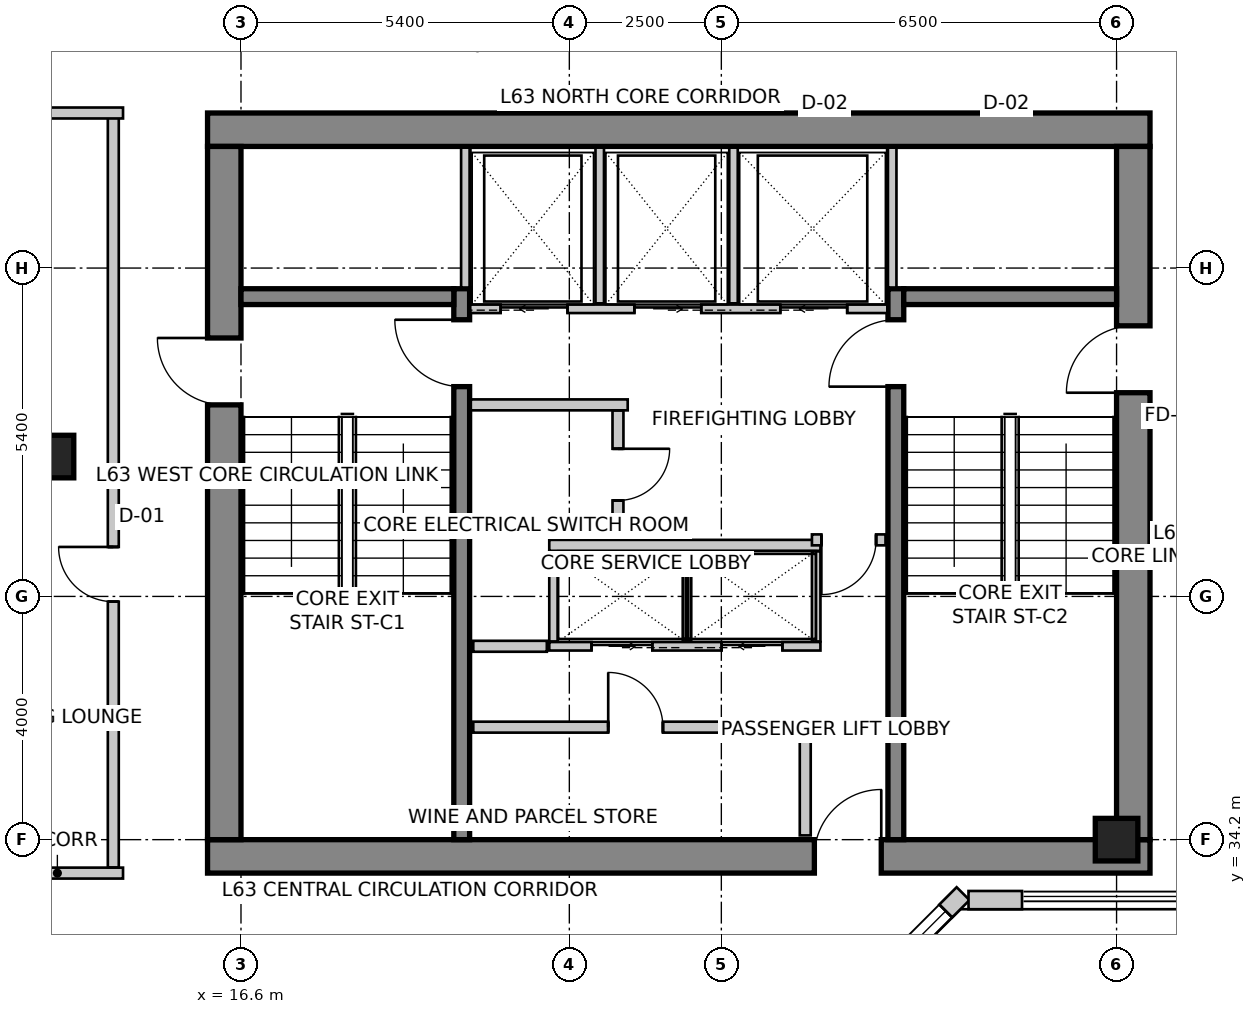
"""IFC4 building model, lengths in metres.
Left out: names, types, materials, properties, quantities, classifications, styles, units other than length and angle.
Written with IfcOpenShell. Run it as: python <this file> out.ifc"""

import sys

from ifc_helpers import new_model, si_unit, direction, frame, frame_2d, origin, origin_2d, place, context, subcontext, project, spatial, rectangle, extrude, source, transform, mapped, element, fill, save


model = new_model("IFC4")
c1 = context("Model", 3, precision=1e-05, world=origin(), true_north=direction((0.0, 1.0)))
c2 = subcontext(c1, "Body", "Model", "MODEL_VIEW")
j1 = project(units=[si_unit("LENGTHUNIT", "METRE"), si_unit("PLANEANGLEUNIT", "RADIAN")], contexts=[c1])
p1 = place(None, origin())
s1 = spatial("IfcSite", under=j1, at=p1, CompositionType="ELEMENT")
p2 = place(p1, origin())
s2 = spatial("IfcBuilding", under=s1, at=p2, CompositionType="ELEMENT")
p3 = place(p2, frame((0.0, 0.0, 249.3)))
s3 = spatial("IfcBuildingStorey", under=s2, at=p3, CompositionType="ELEMENT", Elevation=249.3)
p4 = place(p3, frame((16.05, 45.875, 0.0), z_axis=(0.0, 0.0, 1.0), x_axis=(1.0, 0.0, 0.0)))
e1 = element("IfcWall", 1, at=p4, inside=s3, PredefinedType="SHEAR", context=c2, shape_type="SweptSolid", body=[
    extrude(rectangle(XDim=15.5, YDim=0.55, at=frame_2d((7.75, 0.0))), origin(), (0.0, 0.0, 1.0), 3.6),
])
p5 = place(p3, frame((16.05, 33.925, 0.0), z_axis=(0.0, 0.0, 1.0), x_axis=(1.0, 0.0, 0.0)))
e2 = element("IfcWall", 2, at=p5, inside=s3, PredefinedType="SHEAR", context=c2, shape_type="SweptSolid", body=[
    extrude(rectangle(XDim=15.5, YDim=0.55, at=frame_2d((7.75, 0.0))), origin(), (0.0, 0.0, 1.0), 3.6),
])
m1 = source(origin(), c2, "Body", "SweptSolid", [
    extrude(rectangle(XDim=1.1, YDim=2.15, at=frame_2d((0.55, 1.075))), frame((0.0, 0.285, 0.0), z_axis=(0.0, -1.0, 0.0), x_axis=(1.0, 0.0, 0.0)), (0.0, 0.0, 1.0), 0.57),
])
p6 = place(p5, frame((9.98, 0.0, 0.0)))
e3 = element("IfcOpeningElement", 3, at=p6, cuts=e2, PredefinedType="OPENING", context=c2, shape_type="MappedRepresentation", body=[
    mapped(m1, transform((0.0, 0.0, 0.0), scale=1.0)),
])
p7 = place(p3, frame((16.325, 34.2, 0.0), z_axis=(0.0, 0.0, 1.0), x_axis=(0.0, 1.0, 0.0)))
e4 = element("IfcWall", 4, at=p7, inside=s3, PredefinedType="SHEAR", context=c2, shape_type="SweptSolid", body=[
    extrude(rectangle(XDim=11.4, YDim=0.55, at=frame_2d((5.7, 0.0))), origin(), (0.0, 0.0, 1.0), 3.6),
])
p8 = place(p7, frame((7.15, 0.0, 0.0)))
e5 = element("IfcOpeningElement", 5, at=p8, cuts=e4, PredefinedType="OPENING", context=c2, shape_type="MappedRepresentation", body=[
    mapped(m1, transform((0.0, 0.0, 0.0), scale=1.0)),
])
p9 = place(p3, frame((31.275, 34.2, 0.0), z_axis=(0.0, 0.0, 1.0), x_axis=(0.0, 1.0, 0.0)))
e6 = element("IfcWall", 6, at=p9, inside=s3, PredefinedType="SHEAR", context=c2, shape_type="SweptSolid", body=[
    extrude(rectangle(XDim=11.4, YDim=0.55, at=frame_2d((5.7, 0.0))), origin(), (0.0, 0.0, 1.0), 3.6),
])
p10 = place(p9, frame((7.35, 0.0, 0.0)))
e7 = element("IfcOpeningElement", 7, at=p10, cuts=e6, PredefinedType="OPENING", context=c2, shape_type="MappedRepresentation", body=[
    mapped(m1, transform((0.0, 0.0, 0.0), scale=1.0)),
])
p11 = place(p3, frame((20.23, 34.2, 0.0), z_axis=(0.0, 0.0, 1.0), x_axis=(0.0, 1.0, 0.0)))
e8 = element("IfcWall", 8, at=p11, inside=s3, PredefinedType="SHEAR", context=c2, shape_type="SweptSolid", body=[
    extrude(rectangle(XDim=9.06, YDim=0.26, at=frame_2d((4.53, 0.0))), origin(), (0.0, 0.0, 1.0), 3.6),
])
m2 = source(origin(), c2, "Body", "SweptSolid", [
    extrude(rectangle(XDim=1.1, YDim=2.15, at=frame_2d((0.55, 1.075))), frame((0.0, 0.14, 0.0), z_axis=(0.0, -1.0, 0.0), x_axis=(1.0, 0.0, 0.0)), (0.0, 0.0, 1.0), 0.28),
])
p12 = place(p11, frame((7.45, 0.0, 0.0)))
e9 = element("IfcOpeningElement", 9, at=p12, cuts=e8, PredefinedType="OPENING", context=c2, shape_type="MappedRepresentation", body=[
    mapped(m2, transform((0.0, 0.0, 0.0), scale=1.0)),
])
p13 = place(p3, frame((27.37, 34.2, 0.0), z_axis=(0.0, 0.0, 1.0), x_axis=(0.0, 1.0, 0.0)))
e10 = element("IfcWall", 10, at=p13, inside=s3, PredefinedType="SHEAR", context=c2, shape_type="SweptSolid", body=[
    extrude(rectangle(XDim=9.06, YDim=0.26, at=frame_2d((4.53, 0.0))), origin(), (0.0, 0.0, 1.0), 3.6),
])
p14 = place(p13, frame((7.45, 0.0, 0.0)))
e11 = element("IfcOpeningElement", 11, at=p14, cuts=e10, PredefinedType="OPENING", context=c2, shape_type="MappedRepresentation", body=[
    mapped(m2, transform((0.0, 0.0, 0.0), scale=1.0)),
])
for number, where, z_axis, x_axis in (
    (12, (16.6, 43.13, 0.0), (0.0, 0.0, 1.0), (1.0, 0.0, 0.0)),
    (13, (27.5, 43.13, 0.0), (0.0, 0.0, 1.0), (1.0, 0.0, 0.0)),
):
    element("IfcWall", number, at=place(p3, frame(where, z_axis=z_axis, x_axis=x_axis)), inside=s3, PredefinedType="SHEAR", context=c2, shape_type="SweptSolid", body=[
        extrude(rectangle(XDim=3.5, YDim=0.26, at=frame_2d((1.75, 0.0))), origin(), (0.0, 0.0, 1.0), 3.6),
    ])
m3 = source(origin(), c2, "Body", "SweptSolid", [
    extrude(rectangle(XDim=0.7, YDim=0.7, at=origin_2d()), origin(), (0.0, 0.0, 1.0), 3.6),
])
for number, where, z_axis, x_axis in (
    (14, (13.5, 40.5, 0.0), (0.0, 0.0, 1.0), (1.0, 0.0, 0.0)),
    (15, (31.0, 34.2, 0.0), (0.0, 0.0, 1.0), (1.0, 0.0, 0.0)),
):
    element("IfcColumn", number, at=place(p3, frame(where, z_axis=z_axis, x_axis=x_axis)), inside=s3, PredefinedType="COLUMN", context=c2, shape_type="MappedRepresentation", body=[
        mapped(m3, transform((0.0, 0.0, 0.0), scale=1.0)),
    ])
p15 = place(p3, frame((26.42, 31.256, 0.0), z_axis=(0.0, 0.0, 1.0), x_axis=(0.707106781187, 0.707106781187, 0.0)))
e16 = element("IfcWall", 16, at=p15, inside=s3, PredefinedType="SOLIDWALL", context=c2, shape_type="SweptSolid", body=[
    extrude(rectangle(XDim=2.907, YDim=0.3, at=frame_2d((1.454, 0.0))), origin(), (0.0, 0.0, 1.0), 3.35),
])
m4 = source(origin(), c2, "Body", "SweptSolid", [
    extrude(rectangle(XDim=2.1, YDim=2.0, at=frame_2d((1.05, 1.0))), frame((0.0, 0.16, 0.0), z_axis=(0.0, -1.0, 0.0), x_axis=(1.0, 0.0, 0.0)), (0.0, 0.0, 1.0), 0.32),
])
p16 = place(p15, frame((0.404, 0.0, 0.85)))
e17 = element("IfcOpeningElement", 17, at=p16, cuts=e16, PredefinedType="OPENING", context=c2, shape_type="MappedRepresentation", body=[
    mapped(m4, transform((0.0, 0.0, 0.0), scale=1.0)),
])
p17 = place(p3, frame((28.565, 33.206, 0.0), z_axis=(0.0, 0.0, 1.0), x_axis=(1.0, 0.0, 0.0)))
e18 = element("IfcWall", 18, at=p17, inside=s3, PredefinedType="SOLIDWALL", context=c2, shape_type="SweptSolid", body=[
    extrude(rectangle(XDim=0.88, YDim=0.3, at=frame_2d((0.44, 0.0))), origin(), (0.0, 0.0, 1.0), 3.35),
])
p18 = place(p3, frame((21.874, 52.742, 0.0), z_axis=(0.0, 0.0, 1.0), x_axis=(-0.84365659959, -0.536883173482, 0.0)))
e19 = element("IfcWall", 19, at=p18, inside=s3, PredefinedType="SOLIDWALL", context=c2, shape_type="SweptSolid", body=[
    extrude(rectangle(XDim=10.283, YDim=0.3, at=frame_2d((5.142, 0.0))), origin(), (0.0, 0.0, 1.0), 3.35),
])
m5 = source(origin(), c2, "Body", "SweptSolid", [
    extrude(rectangle(XDim=2.4, YDim=2.2, at=frame_2d((1.2, 1.1))), frame((0.0, 0.16, 0.0), z_axis=(0.0, -1.0, 0.0), x_axis=(1.0, 0.0, 0.0)), (0.0, 0.0, 1.0), 0.32),
])
p19 = place(p18, frame((1.26, 0.0, 0.85)))
e20 = element("IfcOpeningElement", 20, at=p19, cuts=e19, PredefinedType="OPENING", context=c2, shape_type="MappedRepresentation", body=[
    mapped(m5, transform((0.0, 0.0, 0.0), scale=1.0)),
])
p20 = place(p18, frame((5.69, 0.0, 0.85)))
e21 = element("IfcOpeningElement", 21, at=p20, cuts=e19, PredefinedType="OPENING", context=c2, shape_type="MappedRepresentation", body=[
    mapped(m4, transform((0.0, 0.0, 0.0), scale=1.0)),
])
p21 = place(p3, frame((20.37, 42.93, 0.0), z_axis=(0.0, 0.0, 1.0), x_axis=(1.0, 0.0, 0.0)))
e22 = element("IfcWall", 22, at=p21, inside=s3, PredefinedType="SOLIDWALL", context=c2, shape_type="SweptSolid", body=[
    extrude(rectangle(XDim=6.86, YDim=0.14, at=frame_2d((3.43, 0.0))), origin(), (0.0, 0.0, 1.0), 3.35),
])
m6 = source(origin(), c2, "Body", "SweptSolid", [
    extrude(rectangle(XDim=1.1, YDim=2.15, at=frame_2d((0.55, 1.075))), frame((0.0, 0.08, 0.0), z_axis=(0.0, -1.0, 0.0), x_axis=(1.0, 0.0, 0.0)), (0.0, 0.0, 1.0), 0.16),
])
p22 = place(p21, frame((0.5, 0.0, 0.0)))
e23 = element("IfcOpeningElement", 23, at=p22, cuts=e22, PredefinedType="OPENING", context=c2, shape_type="MappedRepresentation", body=[
    mapped(m6, transform((0.0, 0.0, 0.0), scale=1.0)),
])
p23 = place(p21, frame((2.7, 0.0, 0.0)))
e24 = element("IfcOpeningElement", 24, at=p23, cuts=e22, PredefinedType="OPENING", context=c2, shape_type="MappedRepresentation", body=[
    mapped(m6, transform((0.0, 0.0, 0.0), scale=1.0)),
])
p24 = place(p21, frame((5.1, 0.0, 0.0)))
e25 = element("IfcOpeningElement", 25, at=p24, cuts=e22, PredefinedType="OPENING", context=c2, shape_type="MappedRepresentation", body=[
    mapped(m6, transform((0.0, 0.0, 0.0), scale=1.0)),
])
for number, where, z_axis, x_axis in (
    (26, (20.29, 43.28, 0.0), (0.0, 0.0, 1.0), (0.0, 1.0, 0.0)),
    (27, (27.31, 43.28, 0.0), (0.0, 0.0, 1.0), (0.0, 1.0, 0.0)),
):
    element("IfcWall", number, at=place(p3, frame(where, z_axis=z_axis, x_axis=x_axis)), inside=s3, PredefinedType="SOLIDWALL", context=c2, shape_type="SweptSolid", body=[
        extrude(rectangle(XDim=2.3, YDim=0.14, at=frame_2d((1.15, 0.0))), origin(), (0.0, 0.0, 1.0), 3.35),
    ])
for number, where, z_axis, x_axis in (
    (28, (22.5, 43.02, 0.0), (0.0, 0.0, 1.0), (0.0, 1.0, 0.0)),
    (29, (24.7, 43.02, 0.0), (0.0, 0.0, 1.0), (0.0, 1.0, 0.0)),
):
    element("IfcWall", number, at=place(p3, frame(where, z_axis=z_axis, x_axis=x_axis)), inside=s3, PredefinedType="SOLIDWALL", context=c2, shape_type="SweptSolid", body=[
        extrude(rectangle(XDim=2.56, YDim=0.14, at=frame_2d((1.28, 0.0))), origin(), (0.0, 0.0, 1.0), 3.35),
    ])
p25 = place(p3, frame((21.67, 37.38, 0.0), z_axis=(0.0, 0.0, 1.0), x_axis=(1.0, 0.0, 0.0)))
e30 = element("IfcWall", 30, at=p25, inside=s3, PredefinedType="SOLIDWALL", context=c2, shape_type="SweptSolid", body=[
    extrude(rectangle(XDim=4.46, YDim=0.14, at=frame_2d((2.23, 0.0))), origin(), (0.0, 0.0, 1.0), 3.35),
])
m7 = source(origin(), c2, "Body", "SweptSolid", [
    extrude(rectangle(XDim=1.0, YDim=2.15, at=frame_2d((0.5, 1.075))), frame((0.0, 0.08, 0.0), z_axis=(0.0, -1.0, 0.0), x_axis=(1.0, 0.0, 0.0)), (0.0, 0.0, 1.0), 0.16),
])
p26 = place(p25, frame((0.695, 0.0, 0.0)))
e31 = element("IfcOpeningElement", 31, at=p26, cuts=e30, PredefinedType="OPENING", context=c2, shape_type="MappedRepresentation", body=[
    mapped(m7, transform((0.0, 0.0, 0.0), scale=1.0)),
])
p27 = place(p25, frame((2.835, 0.0, 0.0)))
e32 = element("IfcOpeningElement", 32, at=p27, cuts=e30, PredefinedType="OPENING", context=c2, shape_type="MappedRepresentation", body=[
    mapped(m7, transform((0.0, 0.0, 0.0), scale=1.0)),
])
p28 = place(p3, frame((21.67, 39.04, 0.0), z_axis=(0.0, 0.0, 1.0), x_axis=(1.0, 0.0, 0.0)))
e33 = element("IfcWall", 33, at=p28, inside=s3, PredefinedType="SOLIDWALL", context=c2, shape_type="SweptSolid", body=[
    extrude(rectangle(XDim=4.46, YDim=0.18, at=frame_2d((2.23, 0.0))), origin(), (0.0, 0.0, 1.0), 3.35),
])
for number, where, z_axis, x_axis in (
    (34, (26.06, 37.46, 0.0), (0.0, 0.0, 1.0), (0.0, 1.0, 0.0)),
    (35, (21.74, 37.46, 0.0), (0.0, 0.0, 1.0), (0.0, 1.0, 0.0)),
    (36, (23.935, 37.46, 0.0), (0.0, 0.0, 1.0), (0.0, 1.0, 0.0)),
):
    element("IfcWall", number, at=place(p3, frame(where, z_axis=z_axis, x_axis=x_axis)), inside=s3, PredefinedType="SOLIDWALL", context=c2, shape_type="SweptSolid", body=[
        extrude(rectangle(XDim=1.48, YDim=0.14, at=frame_2d((0.74, 0.0))), origin(), (0.0, 0.0, 1.0), 3.35),
    ])
p29 = place(p3, frame((22.96, 41.35, 0.0), z_axis=(0.0, 0.0, 1.0), x_axis=(-1.0, 0.0, 0.0)))
e37 = element("IfcWall", 37, at=p29, inside=s3, PredefinedType="PARTITIONING", context=c2, shape_type="SweptSolid", body=[
    extrude(rectangle(XDim=2.58, YDim=0.18, at=frame_2d((1.29, 0.0))), origin(), (0.0, 0.0, 1.0), 3.35),
])
p30 = place(p3, frame((22.8, 41.256, 0.0), z_axis=(0.0, 0.0, 1.0), x_axis=(0.0, -1.0, 0.0)))
e38 = element("IfcWall", 38, at=p30, inside=s3, PredefinedType="PARTITIONING", context=c2, shape_type="SweptSolid", body=[
    extrude(rectangle(XDim=2.106, YDim=0.18, at=frame_2d((1.053, 0.0))), origin(), (0.0, 0.0, 1.0), 3.35),
])
m8 = source(origin(), c2, "Body", "SweptSolid", [
    extrude(rectangle(XDim=0.85, YDim=2.15, at=frame_2d((0.425, 1.075))), frame((0.0, 0.1, 0.0), z_axis=(0.0, -1.0, 0.0), x_axis=(1.0, 0.0, 0.0)), (0.0, 0.0, 1.0), 0.2),
])
p31 = place(p30, frame((0.628, 0.0, 0.0)))
e39 = element("IfcOpeningElement", 39, at=p31, cuts=e38, PredefinedType="OPENING", context=c2, shape_type="MappedRepresentation", body=[
    mapped(m8, transform((0.0, 0.0, 0.0), scale=1.0)),
])
p32 = place(p3, frame((21.63, 37.38, 0.0), z_axis=(0.0, 0.0, 1.0), x_axis=(-1.0, 0.0, 0.0)))
e40 = element("IfcWall", 40, at=p32, inside=s3, PredefinedType="PARTITIONING", context=c2, shape_type="SweptSolid", body=[
    extrude(rectangle(XDim=1.21, YDim=0.18, at=frame_2d((0.605, 0.0))), origin(), (0.0, 0.0, 1.0), 3.35),
])
p33 = place(p3, frame((27.2, 39.13, 0.0), z_axis=(0.0, 0.0, 1.0), x_axis=(-1.0, 0.0, 0.0)))
e41 = element("IfcWall", 41, at=p33, inside=s3, PredefinedType="PARTITIONING", context=c2, shape_type="SweptSolid", body=[
    extrude(rectangle(XDim=1.21, YDim=0.18, at=frame_2d((0.605, 0.0))), origin(), (0.0, 0.0, 1.0), 3.35),
])
m9 = source(origin(), c2, "Body", "SweptSolid", [
    extrude(rectangle(XDim=0.9, YDim=2.15, at=frame_2d((0.45, 1.075))), frame((0.0, 0.1, 0.0), z_axis=(0.0, -1.0, 0.0), x_axis=(1.0, 0.0, 0.0)), (0.0, 0.0, 1.0), 0.2),
])
p34 = place(p33, frame((0.155, 0.0, 0.0)))
e42 = element("IfcOpeningElement", 42, at=p34, cuts=e41, PredefinedType="OPENING", context=c2, shape_type="MappedRepresentation", body=[
    mapped(m9, transform((0.0, 0.0, 0.0), scale=1.0)),
])
p35 = place(p3, frame((20.42, 36.05, 0.0), z_axis=(0.0, 0.0, 1.0), x_axis=(1.0, 0.0, 0.0)))
e43 = element("IfcWall", 43, at=p35, inside=s3, PredefinedType="PARTITIONING", context=c2, shape_type="SweptSolid", body=[
    extrude(rectangle(XDim=5.46, YDim=0.18, at=frame_2d((2.73, 0.0))), origin(), (0.0, 0.0, 1.0), 3.35),
])
p36 = place(p35, frame((2.219, 0.0, 0.0)))
e44 = element("IfcOpeningElement", 44, at=p36, cuts=e43, PredefinedType="OPENING", context=c2, shape_type="MappedRepresentation", body=[
    mapped(m9, transform((0.0, 0.0, 0.0), scale=1.0)),
])
p37 = place(p3, frame((25.88, 35.956, 0.0), z_axis=(0.0, 0.0, 1.0), x_axis=(0.0, -1.0, 0.0)))
e45 = element("IfcWall", 45, at=p37, inside=s3, PredefinedType="PARTITIONING", context=c2, shape_type="SweptSolid", body=[
    extrude(rectangle(XDim=1.686, YDim=0.18, at=frame_2d((0.843, 0.0))), origin(), (0.0, 0.0, 1.0), 2.642),
])
p38 = place(p3, frame((12.5, 33.65, 0.0), z_axis=(0.0, 0.0, 1.0), x_axis=(1.0, 0.0, 0.0)))
e46 = element("IfcWall", 46, at=p38, inside=s3, PredefinedType="PARTITIONING", context=c2, shape_type="SweptSolid", body=[
    extrude(rectangle(XDim=2.16, YDim=0.18, at=frame_2d((1.08, 0.0))), origin(), (0.0, 0.0, 1.0), 3.35),
])
p39 = place(p3, frame((14.5, 33.744, 0.0), z_axis=(0.0, 0.0, 1.0), x_axis=(0.0, 1.0, 0.0)))
e47 = element("IfcWall", 47, at=p39, inside=s3, PredefinedType="PARTITIONING", context=c2, shape_type="SweptSolid", body=[
    extrude(rectangle(XDim=12.406, YDim=0.18, at=frame_2d((6.203, 0.0))), origin(), (0.0, 0.0, 1.0), 3.35),
])
p40 = place(p39, frame((4.37, 0.0, 0.0)))
e48 = element("IfcOpeningElement", 48, at=p40, cuts=e47, PredefinedType="OPENING", context=c2, shape_type="MappedRepresentation", body=[
    mapped(m9, transform((0.0, 0.0, 0.0), scale=1.0)),
])
p41 = place(p3, frame((14.66, 46.15, 0.0), z_axis=(0.0, 0.0, 1.0), x_axis=(-1.0, 0.0, 0.0)))
e49 = element("IfcWall", 49, at=p41, inside=s3, PredefinedType="PARTITIONING", context=c2, shape_type="SweptSolid", body=[
    extrude(rectangle(XDim=1.602, YDim=0.18, at=frame_2d((0.801, 0.0))), origin(), (0.0, 0.0, 1.0), 3.35),
])
m10 = source(origin(), c2, "Body", "SweptSolid", [
    extrude(rectangle(XDim=2.1, YDim=2.0, at=frame_2d((1.05, 1.0))), frame((0.0, -0.015, 0.0), z_axis=(0.0, -1.0, 0.0), x_axis=(1.0, 0.0, 0.0)), (0.0, 0.0, 1.0), 0.06),
])
p42 = place(p16, origin())
e50 = element("IfcWindow", 50, at=p42, inside=s3, PartitioningType="SINGLE_PANEL", PredefinedType="WINDOW", context=c2, shape_type="MappedRepresentation", body=[
    mapped(m10, transform((0.0, 0.0, 0.0), scale=1.0)),
])
fill(e17, e50)
m11 = source(origin(), c2, "Body", "SweptSolid", [
    extrude(rectangle(XDim=1.1, YDim=2.15, at=frame_2d((0.55, 1.075))), frame((0.0, 0.025, 0.0), z_axis=(0.0, -1.0, 0.0), x_axis=(1.0, 0.0, 0.0)), (0.0, 0.0, 1.0), 0.05),
])
p43 = place(p22, origin())
e51 = element("IfcDoor", 51, at=p43, inside=s3, OperationType="SLIDING_TO_LEFT", PredefinedType="DOOR", context=c2, shape_type="MappedRepresentation", body=[
    mapped(m11, transform((0.0, 0.0, 0.0), scale=1.0)),
])
fill(e23, e51)
p44 = place(p23, origin())
e52 = element("IfcDoor", 52, at=p44, inside=s3, OperationType="SLIDING_TO_RIGHT", PredefinedType="DOOR", context=c2, shape_type="MappedRepresentation", body=[
    mapped(m11, transform((0.0, 0.0, 0.0), scale=1.0)),
])
fill(e24, e52)
m12 = source(origin(), c2, "Body", "SweptSolid", [
    extrude(rectangle(XDim=1.1, YDim=2.15, at=frame_2d((0.55, 1.075))), frame((0.0, 0.025, 0.0), z_axis=(0.0, -1.0, 0.0), x_axis=(1.0, 0.0, 0.0)), (0.0, 0.0, 1.0), 0.05),
])
p45 = place(p24, origin())
e53 = element("IfcDoor", 53, at=p45, inside=s3, OperationType="SLIDING_TO_LEFT", PredefinedType="DOOR", context=c2, shape_type="MappedRepresentation", body=[
    mapped(m12, transform((0.0, 0.0, 0.0), scale=1.0)),
])
fill(e25, e53)
m13 = source(origin(), c2, "Body", "SweptSolid", [
    extrude(rectangle(XDim=1.0, YDim=2.15, at=frame_2d((0.5, 1.075))), frame((0.0, 0.025, 0.0), z_axis=(0.0, -1.0, 0.0), x_axis=(1.0, 0.0, 0.0)), (0.0, 0.0, 1.0), 0.05),
])
p46 = place(p26, origin())
e54 = element("IfcDoor", 54, at=p46, inside=s3, OperationType="SLIDING_TO_RIGHT", PredefinedType="DOOR", context=c2, shape_type="MappedRepresentation", body=[
    mapped(m13, transform((0.0, 0.0, 0.0), scale=1.0)),
])
fill(e31, e54)
p47 = place(p27, origin())
e55 = element("IfcDoor", 55, at=p47, inside=s3, OperationType="SLIDING_TO_LEFT", PredefinedType="DOOR", context=c2, shape_type="MappedRepresentation", body=[
    mapped(m13, transform((0.0, 0.0, 0.0), scale=1.0)),
])
fill(e32, e55)
m14 = source(origin(), c2, "Body", "SweptSolid", [
    extrude(rectangle(XDim=1.1, YDim=2.15, at=frame_2d((0.55, 1.075))), frame((0.0, 0.025, 0.0), z_axis=(0.0, -1.0, 0.0), x_axis=(1.0, 0.0, 0.0)), (0.0, 0.0, 1.0), 0.05),
])
p48 = place(p12, origin())
e56 = element("IfcDoor", 56, at=p48, inside=s3, OperationType="SINGLE_SWING_RIGHT", PredefinedType="DOOR", context=c2, shape_type="MappedRepresentation", body=[
    mapped(m14, transform((0.0, 0.0, 0.0), scale=1.0)),
])
fill(e9, e56)
p49 = place(p14, origin())
e57 = element("IfcDoor", 57, at=p49, inside=s3, OperationType="SINGLE_SWING_LEFT", PredefinedType="DOOR", context=c2, shape_type="MappedRepresentation", body=[
    mapped(m14, transform((0.0, 0.0, 0.0), scale=1.0)),
])
fill(e11, e57)
p50 = place(p8, origin())
e58 = element("IfcDoor", 58, at=p50, inside=s3, OperationType="SINGLE_SWING_RIGHT", PredefinedType="DOOR", context=c2, shape_type="MappedRepresentation", body=[
    mapped(m14, transform((0.0, 0.0, 0.0), scale=1.0)),
])
fill(e5, e58)
p51 = place(p10, origin())
e59 = element("IfcDoor", 59, at=p51, inside=s3, OperationType="SINGLE_SWING_LEFT", PredefinedType="DOOR", context=c2, shape_type="MappedRepresentation", body=[
    mapped(m14, transform((0.0, 0.0, 0.0), scale=1.0)),
])
fill(e7, e59)
p52 = place(p6, origin())
e60 = element("IfcDoor", 60, at=p52, inside=s3, OperationType="SINGLE_SWING_RIGHT", PredefinedType="DOOR", context=c2, shape_type="MappedRepresentation", body=[
    mapped(m14, transform((0.0, 0.0, 0.0), scale=1.0)),
])
fill(e3, e60)
m15 = source(origin(), c2, "Body", "SweptSolid", [
    extrude(rectangle(XDim=0.85, YDim=2.15, at=frame_2d((0.425, 1.075))), frame((0.0, 0.025, 0.0), z_axis=(0.0, -1.0, 0.0), x_axis=(1.0, 0.0, 0.0)), (0.0, 0.0, 1.0), 0.05),
])
p53 = place(p31, origin())
e61 = element("IfcDoor", 61, at=p53, inside=s3, OperationType="SINGLE_SWING_LEFT", PredefinedType="DOOR", context=c2, shape_type="MappedRepresentation", body=[
    mapped(m15, transform((0.0, 0.0, 0.0), scale=1.0)),
])
fill(e39, e61)
m16 = source(origin(), c2, "Body", "SweptSolid", [
    extrude(rectangle(XDim=0.9, YDim=2.15, at=frame_2d((0.45, 1.075))), frame((0.0, 0.025, 0.0), z_axis=(0.0, -1.0, 0.0), x_axis=(1.0, 0.0, 0.0)), (0.0, 0.0, 1.0), 0.05),
])
p54 = place(p34, origin())
e62 = element("IfcDoor", 62, at=p54, inside=s3, OperationType="SINGLE_SWING_RIGHT", PredefinedType="DOOR", context=c2, shape_type="MappedRepresentation", body=[
    mapped(m16, transform((0.0, 0.0, 0.0), scale=1.0)),
])
fill(e42, e62)
p55 = place(p36, origin())
e63 = element("IfcDoor", 63, at=p55, inside=s3, OperationType="SINGLE_SWING_LEFT", PredefinedType="DOOR", context=c2, shape_type="MappedRepresentation", body=[
    mapped(m16, transform((0.0, 0.0, 0.0), scale=1.0)),
])
fill(e44, e63)
m17 = source(origin(), c2, "Body", "SweptSolid", [
    extrude(rectangle(XDim=0.9, YDim=2.15, at=frame_2d((0.45, 1.075))), frame((0.0, 0.025, 0.0), z_axis=(0.0, -1.0, 0.0), x_axis=(1.0, 0.0, 0.0)), (0.0, 0.0, 1.0), 0.05),
])
p56 = place(p40, origin())
e64 = element("IfcDoor", 64, at=p56, inside=s3, OperationType="SINGLE_SWING_RIGHT", PredefinedType="DOOR", context=c2, shape_type="MappedRepresentation", body=[
    mapped(m17, transform((0.0, 0.0, 0.0), scale=1.0)),
])
fill(e48, e64)
save(model, sys.argv[1])
